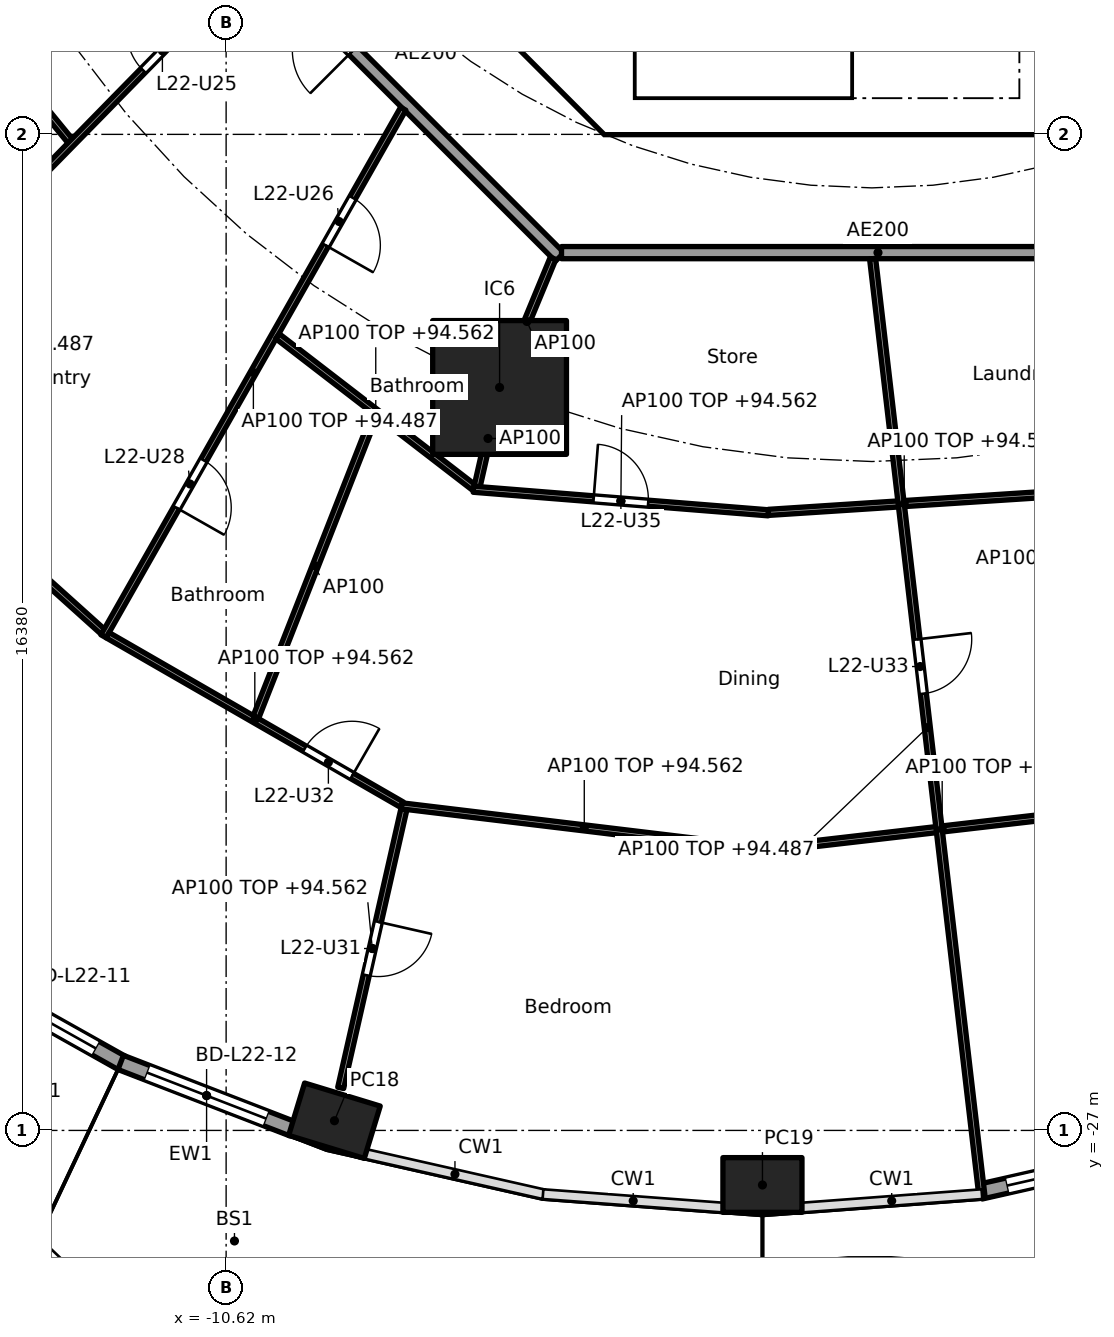
"""IFC4 building model, lengths in metres.
Left out: names, types, materials, properties, quantities, classifications, styles, units other than length and angle.
Written with IfcOpenShell. Run it as: python <this file> out.ifc"""

import sys

from ifc_helpers import new_model, si_unit, direction, frame, frame_2d, origin, origin_2d, place, context, subcontext, project, spatial, polyline, rectangle, hollow_rectangle, outline, extrude, element, fill, save


model = new_model("IFC4")
c1 = context("Model", 3, precision=1e-05, world=origin(), true_north=direction((0.0, 1.0)))
c2 = subcontext(c1, "Body", "Model", "MODEL_VIEW")
j1 = project(units=[si_unit("LENGTHUNIT", "METRE"), si_unit("PLANEANGLEUNIT", "RADIAN")], contexts=[c1])
p1 = place(None, origin())
s1 = spatial("IfcSite", under=j1, at=p1, CompositionType="ELEMENT")
p2 = place(p1, origin())
s2 = spatial("IfcBuilding", under=s1, at=p2, CompositionType="ELEMENT")
p3 = place(p2, frame((0.0, 0.0, 91.8)))
s3 = spatial("IfcBuildingStorey", under=s2, at=p3, CompositionType="ELEMENT", Elevation=91.8)
for number, where, z_axis, x_axis in (
    (1, (-8.839, -26.841, 0.0), (0.0, 0.0, 1.0), (0.957, -0.292, 0.0)),
    (2, (-1.8, -27.897, 0.0), (0.0, 0.0, 1.0), (1.0, 0.0, 0.0)),
):
    element("IfcColumn", number, at=place(p3, frame(where, z_axis=z_axis, x_axis=x_axis)), inside=s3, PredefinedType="COLUMN", context=c2, shape_type="SweptSolid", body=[
        extrude(hollow_rectangle(XDim=1.3, YDim=0.9, WallThickness=0.045, at=origin_2d()), origin(), (0.0, 0.0, 1.0), 3.7),
    ])
p4 = place(p3, frame((-6.123, -14.782, 0.0), z_axis=(0.0, 0.0, 1.0), x_axis=(1.0, 0.0, 0.0)))
e3 = element("IfcColumn", 3, at=p4, inside=s3, PredefinedType="COLUMN", context=c2, shape_type="SweptSolid", body=[
    extrude(rectangle(XDim=2.2, YDim=2.2, at=origin_2d()), origin(), (0.0, 0.0, 1.0), 3.7),
])
p5 = place(p3, frame((-12.337, -25.889, 0.0), z_axis=(0.0, 0.0, 1.0), x_axis=(-0.872090167423, 0.489345215451, 0.0)))
e4 = element("IfcWall", 4, at=p5, inside=s3, PredefinedType="SOLIDWALL", context=c2, shape_type="SweptSolid", body=[
    extrude(rectangle(XDim=3.076, YDim=0.25, at=frame_2d((1.538, 0.0))), origin(), (0.0, 0.0, 1.0), 3.44),
])
p6 = place(p5, frame((0.488, 0.0, 0.0)))
e5 = element("IfcOpeningElement", 5, at=p6, cuts=e4, PredefinedType="OPENING", context=c2, shape_type="SweptSolid", body=[
    extrude(rectangle(XDim=2.1, YDim=2.4, at=frame_2d((1.05, 1.2))), frame((0.0, 0.135, 0.0), z_axis=(0.0, -1.0, 0.0), x_axis=(1.0, 0.0, 0.0)), (0.0, 0.0, 1.0), 0.27),
])
p7 = place(p3, frame((-9.529, -26.973, 0.0), z_axis=(0.0, 0.0, 1.0), x_axis=(-0.932827091302, 0.360324322982, 0.0)))
e6 = element("IfcWall", 6, at=p7, inside=s3, PredefinedType="SOLIDWALL", context=c2, shape_type="SweptSolid", body=[
    extrude(rectangle(XDim=3.027, YDim=0.25, at=frame_2d((1.514, 0.0))), origin(), (0.0, 0.0, 1.0), 3.44),
])
p8 = place(p7, frame((0.464, 0.0, 0.0)))
e7 = element("IfcOpeningElement", 7, at=p8, cuts=e6, PredefinedType="OPENING", context=c2, shape_type="SweptSolid", body=[
    extrude(rectangle(XDim=2.1, YDim=2.4, at=frame_2d((1.05, 1.2))), frame((0.0, 0.135, 0.0), z_axis=(0.0, -1.0, 0.0), x_axis=(1.0, 0.0, 0.0)), (0.0, 0.0, 1.0), 0.27),
])
p9 = place(p3, frame((4.707, -27.345, 0.0), z_axis=(0.0, 0.0, 1.0), x_axis=(-0.975317607872, -0.220806620767, 0.0)))
e8 = element("IfcWall", 8, at=p9, inside=s3, PredefinedType="SOLIDWALL", context=c2, shape_type="SweptSolid", body=[
    extrude(rectangle(XDim=2.993, YDim=0.25, at=frame_2d((1.497, 0.0))), origin(), (0.0, 0.0, 1.0), 3.44),
])
p10 = place(p9, frame((0.447, 0.0, 0.0)))
e9 = element("IfcOpeningElement", 9, at=p10, cuts=e8, PredefinedType="OPENING", context=c2, shape_type="SweptSolid", body=[
    extrude(rectangle(XDim=2.1, YDim=2.4, at=frame_2d((1.05, 1.2))), frame((0.0, 0.135, 0.0), z_axis=(0.0, -1.0, 0.0), x_axis=(1.0, 0.0, 0.0)), (0.0, 0.0, 1.0), 0.27),
])
p11 = place(p3, frame((-9.988, -4.613, 0.0), z_axis=(0.0, 0.0, 1.0), x_axis=(0.707106781187, -0.707106781187, 0.0)))
e10 = element("IfcWall", 10, at=p11, inside=s3, PredefinedType="SHEAR", context=c2, shape_type="SweptSolid", body=[
    extrude(rectangle(XDim=7.602, YDim=0.6, at=frame_2d((3.801, 0.0))), origin(), (0.0, 0.0, 1.0), 3.44),
])
p12 = place(p11, frame((6.151, 0.0, 0.0)))
e11 = element("IfcOpeningElement", 11, at=p12, cuts=e10, PredefinedType="OPENING", context=c2, shape_type="SweptSolid", body=[
    extrude(rectangle(XDim=1.1, YDim=2.1, at=frame_2d((0.55, 1.05))), frame((0.0, 0.31, 0.0), z_axis=(0.0, -1.0, 0.0), x_axis=(1.0, 0.0, 0.0)), (0.0, 0.0, 1.0), 0.62),
])
p13 = place(p3, origin())
e12 = element("IfcWall", 12, at=p13, inside=s3, PredefinedType="SHEAR", context=c2, shape_type="SweptSolid", body=[
    extrude(outline(polyline([(-4.152, -10.025), (4.152, -10.025), (4.401, -9.776), (4.825, -10.2), (4.401, -10.625), (-4.401, -10.625), (-4.825, -10.2), (-4.401, -9.776), (-4.152, -10.025)])), origin(), (0.0, 0.0, 1.0), 3.44),
])
p14 = place(p3, origin())
e13 = element("IfcWall", 13, at=p14, inside=s3, PredefinedType="SOLIDWALL", context=c2, shape_type="SweptSolid", body=[
    extrude(outline(polyline([(-3.9, -10.025), (-4.1, -10.025), (-4.1, -7.025), (-3.9, -7.025), (-3.9, -10.025)])), origin(), (0.0, 0.0, 1.0), 3.44),
])
p15 = place(p3, frame((-12.635, -5.134, 0.0), z_axis=(0.0, 0.0, 1.0), x_axis=(0.707106781187, -0.707106781187, 0.0)))
e14 = element("IfcWall", 14, at=p15, inside=s3, PredefinedType="PARTITIONING", context=c2, shape_type="SweptSolid", body=[
    extrude(rectangle(XDim=10.609, YDim=0.2, at=frame_2d((5.305, 0.0))), origin(), (0.0, 0.0, 1.0), 3.44),
])
p16 = place(p15, frame((4.804, 0.0, 0.0)))
e15 = element("IfcOpeningElement", 15, at=p16, cuts=e14, PredefinedType="OPENING", context=c2, shape_type="SweptSolid", body=[
    extrude(rectangle(XDim=1.0, YDim=2.1, at=frame_2d((0.5, 1.05))), frame((0.0, 0.11, 0.0), z_axis=(0.0, -1.0, 0.0), x_axis=(1.0, 0.0, 0.0)), (0.0, 0.0, 1.0), 0.22),
])
p17 = place(p3, frame((-5.104, -12.565, 0.0), z_axis=(0.0, 0.0, 1.0), x_axis=(1.0, 0.0, 0.0)))
e16 = element("IfcWall", 16, at=p17, inside=s3, PredefinedType="PARTITIONING", context=c2, shape_type="SweptSolid", body=[
    extrude(rectangle(XDim=10.409, YDim=0.2, at=frame_2d((5.205, 0.0))), origin(), (0.0, 0.0, 1.0), 3.44),
])
p18 = place(p3, frame((-16.182, -7.067, 0.0), z_axis=(0.0, 0.0, 1.0), x_axis=(0.633400832951, -0.773823871962, 0.0)))
e17 = element("IfcWall", 17, at=p18, inside=s3, PredefinedType="PARTITIONING", context=c2, shape_type="SweptSolid", body=[
    extrude(rectangle(XDim=4.729, YDim=0.1, at=frame_2d((2.365, 0.0))), origin(), (0.0, 0.0, 1.0), 2.762),
])
p19 = place(p3, frame((-10.181, -7.729, 0.0), z_axis=(0.0, 0.0, 1.0), x_axis=(-0.699708106083, -0.714428839201, 0.0)))
e18 = element("IfcWall", 18, at=p19, inside=s3, PredefinedType="PARTITIONING", context=c2, shape_type="SweptSolid", body=[
    extrude(rectangle(XDim=14.959, YDim=0.1, at=frame_2d((7.48, 0.0))), origin(), (0.0, 0.0, 1.0), 2.687),
])
p20 = place(p19, frame((1.675, 0.0, 0.0)))
e19 = element("IfcOpeningElement", 19, at=p20, cuts=e18, PredefinedType="OPENING", context=c2, shape_type="SweptSolid", body=[
    extrude(rectangle(XDim=0.9, YDim=2.1, at=frame_2d((0.45, 1.05))), frame((0.0, 0.06, 0.0), z_axis=(0.0, -1.0, 0.0), x_axis=(1.0, 0.0, 0.0)), (0.0, 0.0, 1.0), 0.12),
])
p21 = place(p19, frame((6.619, 0.0, 0.0)))
e20 = element("IfcOpeningElement", 20, at=p21, cuts=e18, PredefinedType="OPENING", context=c2, shape_type="SweptSolid", body=[
    extrude(rectangle(XDim=0.9, YDim=2.1, at=frame_2d((0.45, 1.05))), frame((0.0, 0.06, 0.0), z_axis=(0.0, -1.0, 0.0), x_axis=(1.0, 0.0, 0.0)), (0.0, 0.0, 1.0), 0.12),
])
p22 = place(p3, frame((-17.063, -14.827, 0.0), z_axis=(0.0, 0.0, 1.0), x_axis=(0.743478142868, -0.668760234373, 0.0)))
e21 = element("IfcWall", 21, at=p22, inside=s3, PredefinedType="PARTITIONING", context=c2, shape_type="SweptSolid", body=[
    extrude(rectangle(XDim=5.937, YDim=0.1, at=frame_2d((2.969, 0.0))), origin(), (0.0, 0.0, 1.0), 2.762),
])
p23 = place(p22, frame((2.519, 0.0, 0.0)))
e22 = element("IfcOpeningElement", 22, at=p23, cuts=e21, PredefinedType="OPENING", context=c2, shape_type="SweptSolid", body=[
    extrude(rectangle(XDim=0.9, YDim=2.1, at=frame_2d((0.45, 1.05))), frame((0.0, 0.06, 0.0), z_axis=(0.0, -1.0, 0.0), x_axis=(1.0, 0.0, 0.0)), (0.0, 0.0, 1.0), 0.12),
])
p24 = place(p3, frame((-7.707, -10.198, 0.0), z_axis=(0.0, 0.0, 1.0), x_axis=(-0.493963587489, -0.869482589955, 0.0)))
e23 = element("IfcWall", 23, at=p24, inside=s3, PredefinedType="PARTITIONING", context=c2, shape_type="SweptSolid", body=[
    extrude(rectangle(XDim=9.978, YDim=0.1, at=frame_2d((4.989, 0.0))), origin(), (0.0, 0.0, 1.0), 2.687),
])
p25 = place(p24, frame((1.684, 0.0, 0.0)))
e24 = element("IfcOpeningElement", 24, at=p25, cuts=e23, PredefinedType="OPENING", context=c2, shape_type="SweptSolid", body=[
    extrude(rectangle(XDim=0.9, YDim=2.1, at=frame_2d((0.45, 1.05))), frame((0.0, 0.06, 0.0), z_axis=(0.0, -1.0, 0.0), x_axis=(1.0, 0.0, 0.0)), (0.0, 0.0, 1.0), 0.12),
])
p26 = place(p24, frame((6.648, 0.0, 0.0)))
e25 = element("IfcOpeningElement", 25, at=p26, cuts=e23, PredefinedType="OPENING", context=c2, shape_type="SweptSolid", body=[
    extrude(rectangle(XDim=0.9, YDim=2.1, at=frame_2d((0.45, 1.05))), frame((0.0, 0.06, 0.0), z_axis=(0.0, -1.0, 0.0), x_axis=(1.0, 0.0, 0.0)), (0.0, 0.0, 1.0), 0.12),
])
p27 = place(p3, frame((-9.775, -13.939, 0.0), z_axis=(0.0, 0.0, 1.0), x_axis=(0.792156642473, -0.61031783014, 0.0)))
e26 = element("IfcWall", 26, at=p27, inside=s3, PredefinedType="PARTITIONING", context=c2, shape_type="SweptSolid", body=[
    extrude(rectangle(XDim=4.08, YDim=0.1, at=frame_2d((2.04, 0.0))), origin(), (0.0, 0.0, 1.0), 2.762),
])
p28 = place(p3, frame((-12.568, -18.856, 0.0), z_axis=(0.0, 0.0, 1.0), x_axis=(0.866532513598, -0.499120629585, 0.0)))
e27 = element("IfcWall", 27, at=p28, inside=s3, PredefinedType="PARTITIONING", context=c2, shape_type="SweptSolid", body=[
    extrude(rectangle(XDim=5.585, YDim=0.1, at=frame_2d((2.792, 0.0))), origin(), (0.0, 0.0, 1.0), 2.762),
])
p29 = place(p28, frame((3.739, 0.0, 0.0)))
e28 = element("IfcOpeningElement", 28, at=p29, cuts=e27, PredefinedType="OPENING", context=c2, shape_type="SweptSolid", body=[
    extrude(rectangle(XDim=0.9, YDim=2.1, at=frame_2d((0.45, 1.05))), frame((0.0, 0.06, 0.0), z_axis=(0.0, -1.0, 0.0), x_axis=(1.0, 0.0, 0.0)), (0.0, 0.0, 1.0), 0.12),
])
p30 = place(p3, frame((-8.177, -15.231, 0.0), z_axis=(0.0, 0.0, 1.0), x_axis=(-0.365520869553, -0.930803144559, 0.0)))
e29 = element("IfcWall", 29, at=p30, inside=s3, PredefinedType="PARTITIONING", context=c2, shape_type="SweptSolid", body=[
    extrude(rectangle(XDim=5.342, YDim=0.1, at=frame_2d((2.671, 0.0))), origin(), (0.0, 0.0, 1.0), 3.44),
])
p31 = place(p3, frame((-5.243, -12.657, 0.0), z_axis=(0.0, 0.0, 1.0), x_axis=(-0.382719158442, -0.923864733477, 0.0)))
e30 = element("IfcWall", 30, at=p31, inside=s3, PredefinedType="PARTITIONING", context=c2, shape_type="SweptSolid", body=[
    extrude(rectangle(XDim=2.25, YDim=0.1, at=frame_2d((1.125, 0.0))), origin(), (0.0, 0.0, 1.0), 3.44),
])
p32 = place(p3, frame((-6.134, -14.831, 0.0), z_axis=(0.0, 0.0, 1.0), x_axis=(-0.221269290858, -0.975212746493, 0.0)))
e31 = element("IfcWall", 31, at=p32, inside=s3, PredefinedType="PARTITIONING", context=c2, shape_type="SweptSolid", body=[
    extrude(rectangle(XDim=1.62, YDim=0.1, at=frame_2d((0.81, 0.0))), origin(), (0.0, 0.0, 1.0), 3.44),
])
p33 = place(p3, frame((-6.553, -16.456, 0.0), z_axis=(0.0, 0.0, 1.0), x_axis=(0.996817033118, -0.079723286975, 0.0)))
e32 = element("IfcWall", 32, at=p33, inside=s3, PredefinedType="PARTITIONING", context=c2, shape_type="SweptSolid", body=[
    extrude(rectangle(XDim=4.866, YDim=0.1, at=frame_2d((2.433, 0.0))), origin(), (0.0, 0.0, 1.0), 2.762),
])
p34 = place(p33, frame((1.983, 0.0, 0.0)))
e33 = element("IfcOpeningElement", 33, at=p34, cuts=e32, PredefinedType="OPENING", context=c2, shape_type="SweptSolid", body=[
    extrude(rectangle(XDim=0.9, YDim=2.1, at=frame_2d((0.45, 1.05))), frame((0.0, 0.06, 0.0), z_axis=(0.0, -1.0, 0.0), x_axis=(1.0, 0.0, 0.0)), (0.0, 0.0, 1.0), 0.12),
])
p35 = place(p3, frame((-7.696, -21.717, 0.0), z_axis=(0.0, 0.0, 1.0), x_axis=(-0.221196717441, -0.97522921008, 0.0)))
e34 = element("IfcWall", 34, at=p35, inside=s3, PredefinedType="PARTITIONING", context=c2, shape_type="SweptSolid", body=[
    extrude(rectangle(XDim=4.7, YDim=0.1, at=frame_2d((2.35, 0.0))), origin(), (0.0, 0.0, 1.0), 2.762),
])
p36 = place(p35, frame((1.9, 0.0, 0.0)))
e35 = element("IfcOpeningElement", 35, at=p36, cuts=e34, PredefinedType="OPENING", context=c2, shape_type="SweptSolid", body=[
    extrude(rectangle(XDim=0.9, YDim=2.1, at=frame_2d((0.45, 1.05))), frame((0.0, 0.06, 0.0), z_axis=(0.0, -1.0, 0.0), x_axis=(1.0, 0.0, 0.0)), (0.0, 0.0, 1.0), 0.12),
])
p37 = place(p3, frame((-7.735, -21.662, 0.0), z_axis=(0.0, 0.0, 1.0), x_axis=(0.992808347289, -0.119714600421, 0.0)))
e36 = element("IfcWall", 36, at=p37, inside=s3, PredefinedType="PARTITIONING", context=c2, shape_type="SweptSolid", body=[
    extrude(rectangle(XDim=6.053, YDim=0.1, at=frame_2d((3.026, 0.0))), origin(), (0.0, 0.0, 1.0), 2.762),
])
p38 = place(p3, frame((-1.703, -16.836, 0.0), z_axis=(0.0, 0.0, 1.0), x_axis=(0.997899919101, 0.064774620473, 0.0)))
e37 = element("IfcWall", 37, at=p38, inside=s3, PredefinedType="PARTITIONING", context=c2, shape_type="SweptSolid", body=[
    extrude(rectangle(XDim=4.478, YDim=0.1, at=frame_2d((2.239, 0.0))), origin(), (0.0, 0.0, 1.0), 2.762),
])
p39 = place(p3, frame((-1.726, -22.375, 0.0), z_axis=(0.0, 0.0, 1.0), x_axis=(0.993392336919, 0.114767874207, 0.0)))
e38 = element("IfcWall", 38, at=p39, inside=s3, PredefinedType="PARTITIONING", context=c2, shape_type="SweptSolid", body=[
    extrude(rectangle(XDim=5.801, YDim=0.1, at=frame_2d((2.9, 0.0))), origin(), (0.0, 0.0, 1.0), 2.762),
])
p40 = place(p3, frame((0.011, -12.664, 0.0), z_axis=(0.0, 0.0, 1.0), x_axis=(0.115841404661, -0.993267722704, 0.0)))
e39 = element("IfcWall", 39, at=p40, inside=s3, PredefinedType="PARTITIONING", context=c2, shape_type="SweptSolid", body=[
    extrude(rectangle(XDim=15.528, YDim=0.1, at=frame_2d((7.764, 0.0))), origin(), (0.0, 0.0, 1.0), 2.687),
])
p41 = place(p40, frame((6.303, 0.0, 0.0)))
e40 = element("IfcOpeningElement", 40, at=p41, cuts=e39, PredefinedType="OPENING", context=c2, shape_type="SweptSolid", body=[
    extrude(rectangle(XDim=0.9, YDim=2.1, at=frame_2d((0.45, 1.05))), frame((0.0, 0.06, 0.0), z_axis=(0.0, -1.0, 0.0), x_axis=(1.0, 0.0, 0.0)), (0.0, 0.0, 1.0), 0.12),
])
p42 = place(p6, origin())
e41 = element("IfcDoor", 41, at=p42, inside=s3, OperationType="SLIDING_TO_LEFT", PredefinedType="DOOR", context=c2, shape_type="SweptSolid", body=[
    extrude(rectangle(XDim=2.1, YDim=2.4, at=frame_2d((1.05, 1.2))), frame((0.0, 0.025, 0.0), z_axis=(0.0, -1.0, 0.0), x_axis=(1.0, 0.0, 0.0)), (0.0, 0.0, 1.0), 0.05),
])
fill(e5, e41)
p43 = place(p8, origin())
e42 = element("IfcDoor", 42, at=p43, inside=s3, OperationType="SLIDING_TO_LEFT", PredefinedType="DOOR", context=c2, shape_type="SweptSolid", body=[
    extrude(rectangle(XDim=2.1, YDim=2.4, at=frame_2d((1.05, 1.2))), frame((0.0, 0.025, 0.0), z_axis=(0.0, -1.0, 0.0), x_axis=(1.0, 0.0, 0.0)), (0.0, 0.0, 1.0), 0.05),
])
fill(e7, e42)
p44 = place(p10, origin())
e43 = element("IfcDoor", 43, at=p44, inside=s3, OperationType="SLIDING_TO_LEFT", PredefinedType="DOOR", context=c2, shape_type="SweptSolid", body=[
    extrude(rectangle(XDim=2.1, YDim=2.4, at=frame_2d((1.05, 1.2))), frame((0.0, 0.025, 0.0), z_axis=(0.0, -1.0, 0.0), x_axis=(1.0, 0.0, 0.0)), (0.0, 0.0, 1.0), 0.05),
])
fill(e9, e43)
p45 = place(p12, origin())
e44 = element("IfcDoor", 44, at=p45, inside=s3, OperationType="SINGLE_SWING_RIGHT", PredefinedType="DOOR", context=c2, shape_type="SweptSolid", body=[
    extrude(rectangle(XDim=1.1, YDim=2.1, at=frame_2d((0.55, 1.05))), frame((0.0, 0.025, 0.0), z_axis=(0.0, -1.0, 0.0), x_axis=(1.0, 0.0, 0.0)), (0.0, 0.0, 1.0), 0.05),
])
fill(e11, e44)
p46 = place(p20, frame((0.9, 0.0, 0.0), x_axis=(-1.0, 0.0, 0.0)))
e45 = element("IfcDoor", 45, at=p46, inside=s3, OperationType="SINGLE_SWING_RIGHT", PredefinedType="DOOR", context=c2, shape_type="SweptSolid", body=[
    extrude(rectangle(XDim=0.9, YDim=2.1, at=frame_2d((0.45, 1.05))), frame((0.0, 0.025, 0.0), z_axis=(0.0, -1.0, 0.0), x_axis=(1.0, 0.0, 0.0)), (0.0, 0.0, 1.0), 0.05),
])
fill(e19, e45)
p47 = place(p25, origin())
e46 = element("IfcDoor", 46, at=p47, inside=s3, OperationType="SINGLE_SWING_RIGHT", PredefinedType="DOOR", context=c2, shape_type="SweptSolid", body=[
    extrude(rectangle(XDim=0.9, YDim=2.1, at=frame_2d((0.45, 1.05))), frame((0.0, 0.025, 0.0), z_axis=(0.0, -1.0, 0.0), x_axis=(1.0, 0.0, 0.0)), (0.0, 0.0, 1.0), 0.05),
])
fill(e24, e46)
p48 = place(p26, origin())
e47 = element("IfcDoor", 47, at=p48, inside=s3, OperationType="SINGLE_SWING_RIGHT", PredefinedType="DOOR", context=c2, shape_type="SweptSolid", body=[
    extrude(rectangle(XDim=0.9, YDim=2.1, at=frame_2d((0.45, 1.05))), frame((0.0, 0.025, 0.0), z_axis=(0.0, -1.0, 0.0), x_axis=(1.0, 0.0, 0.0)), (0.0, 0.0, 1.0), 0.05),
])
fill(e25, e47)
p49 = place(p36, origin())
e48 = element("IfcDoor", 48, at=p49, inside=s3, OperationType="SINGLE_SWING_LEFT", PredefinedType="DOOR", context=c2, shape_type="SweptSolid", body=[
    extrude(rectangle(XDim=0.9, YDim=2.1, at=frame_2d((0.45, 1.05))), frame((0.0, 0.025, 0.0), z_axis=(0.0, -1.0, 0.0), x_axis=(1.0, 0.0, 0.0)), (0.0, 0.0, 1.0), 0.05),
])
fill(e35, e48)
p50 = place(p29, origin())
e49 = element("IfcDoor", 49, at=p50, inside=s3, OperationType="SINGLE_SWING_RIGHT", PredefinedType="DOOR", context=c2, shape_type="SweptSolid", body=[
    extrude(rectangle(XDim=0.9, YDim=2.1, at=frame_2d((0.45, 1.05))), frame((0.0, 0.025, 0.0), z_axis=(0.0, -1.0, 0.0), x_axis=(1.0, 0.0, 0.0)), (0.0, 0.0, 1.0), 0.05),
])
fill(e28, e49)
p51 = place(p41, origin())
e50 = element("IfcDoor", 50, at=p51, inside=s3, OperationType="SINGLE_SWING_LEFT", PredefinedType="DOOR", context=c2, shape_type="SweptSolid", body=[
    extrude(rectangle(XDim=0.9, YDim=2.1, at=frame_2d((0.45, 1.05))), frame((0.0, 0.025, 0.0), z_axis=(0.0, -1.0, 0.0), x_axis=(1.0, 0.0, 0.0)), (0.0, 0.0, 1.0), 0.05),
])
fill(e40, e50)
p52 = place(p34, origin())
e51 = element("IfcDoor", 51, at=p52, inside=s3, OperationType="SINGLE_SWING_LEFT", PredefinedType="DOOR", context=c2, shape_type="SweptSolid", body=[
    extrude(rectangle(XDim=0.9, YDim=2.1, at=frame_2d((0.45, 1.05))), frame((0.0, 0.025, 0.0), z_axis=(0.0, -1.0, 0.0), x_axis=(1.0, 0.0, 0.0)), (0.0, 0.0, 1.0), 0.05),
])
fill(e33, e51)
save(model, sys.argv[1])
